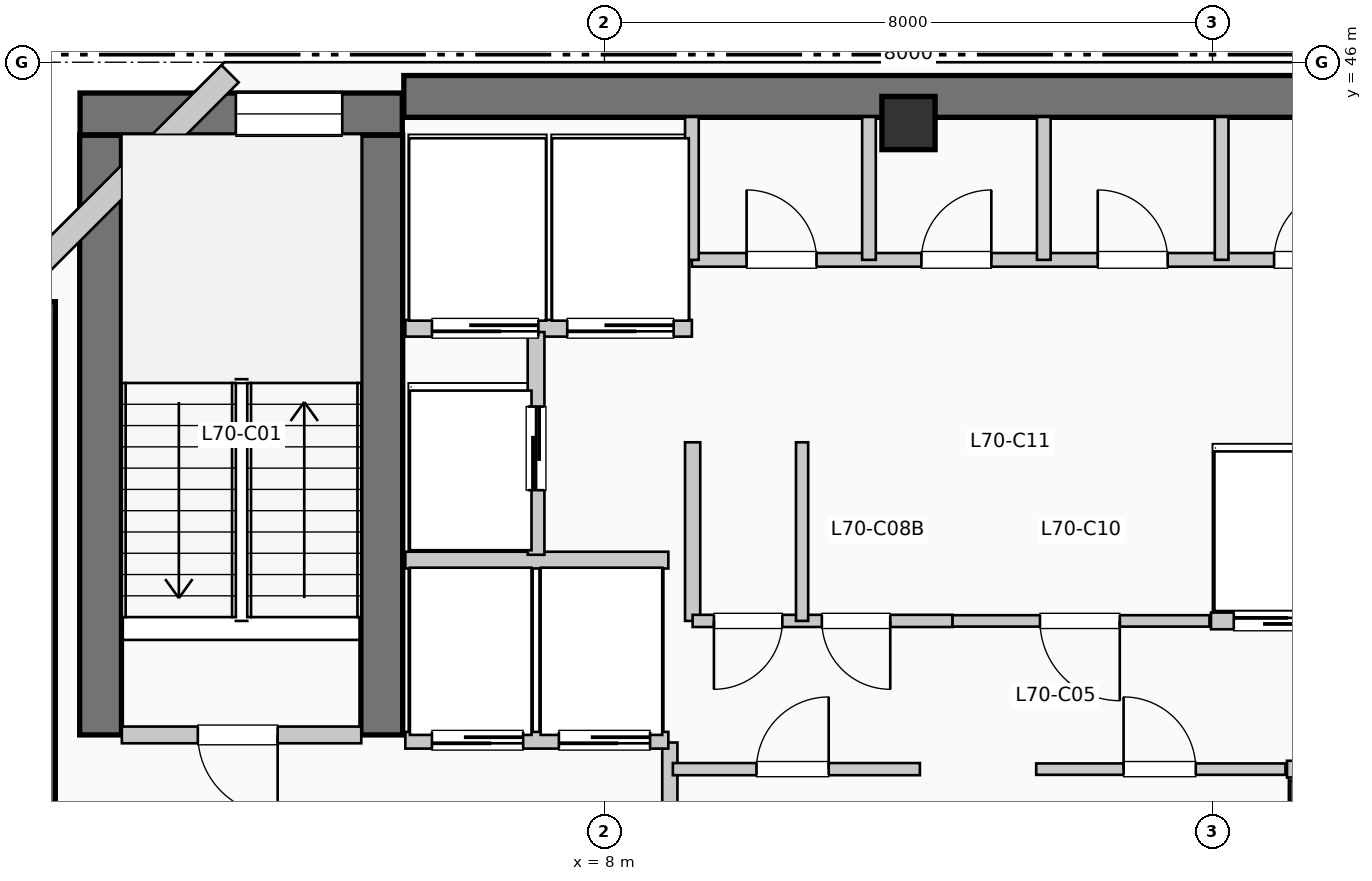
"""IFC4 building model, lengths in metres.
Left out: names, types, materials, properties, quantities, classifications, styles, units other than length and angle.
Written with IfcOpenShell. Run it as: python <this file> out.ifc"""

import sys

from ifc_helpers import new_model, si_unit, direction, frame, frame_2d, origin, origin_2d, place, context, subcontext, project, spatial, rectangle, extrude, element, fill, save


model = new_model("IFC4")
c1 = context("Model", 3, precision=1e-05, world=origin(), true_north=direction((0.0, 1.0)))
c2 = subcontext(c1, "Body", "Model", "MODEL_VIEW")
j1 = project(units=[si_unit("LENGTHUNIT", "METRE"), si_unit("PLANEANGLEUNIT", "RADIAN")], contexts=[c1])
p1 = place(None, origin())
s1 = spatial("IfcSite", under=j1, at=p1, CompositionType="ELEMENT")
p2 = place(p1, origin())
s2 = spatial("IfcBuilding", under=s1, at=p2, CompositionType="ELEMENT")
p3 = place(p2, frame((0.0, 0.0, 288.09)))
s3 = spatial("IfcBuildingStorey", under=s2, at=p3, CompositionType="ELEMENT", Elevation=288.09)
p4 = place(p3, frame((5.36, 45.55, 0.0), z_axis=(0.0, 0.0, 1.0), x_axis=(1.0, 0.0, 0.0)))
e1 = element("IfcWall", 1, at=p4, inside=s3, PredefinedType="SHEAR", context=c2, shape_type="SweptSolid", body=[
    extrude(rectangle(XDim=13.98, YDim=0.55, at=frame_2d((6.99, 0.0))), origin(), (0.0, 0.0, 1.0), 3.96),
])
p5 = place(p3, frame((0.5, 34.95, 0.0), z_axis=(0.0, 0.0, 1.0), x_axis=(0.0, 1.0, 0.0)))
e2 = element("IfcWall", 2, at=p5, inside=s3, PredefinedType="SHEAR", context=c2, shape_type="SweptSolid", body=[
    extrude(rectangle(XDim=7.9, YDim=0.55, at=frame_2d((3.95, 0.0))), origin(), (0.0, 0.0, 1.0), 3.96),
])
for number, where, z_axis, x_axis in (
    (3, (1.37, 37.15, 0.0), (0.0, 0.0, 1.0), (0.0, 1.0, 0.0)),
    (4, (5.07, 37.15, 0.0), (0.0, 0.0, 1.0), (0.0, 1.0, 0.0)),
):
    element("IfcWall", number, at=place(p3, frame(where, z_axis=z_axis, x_axis=x_axis)), inside=s3, PredefinedType="SHEAR", context=c2, shape_type="SweptSolid", body=[
        extrude(rectangle(XDim=7.89, YDim=0.55, at=frame_2d((3.945, 0.0))), origin(), (0.0, 0.0, 1.0), 3.96),
    ])
p6 = place(p3, frame((1.1, 45.32, 0.0), z_axis=(0.0, 0.0, 1.0), x_axis=(1.0, 0.0, 0.0)))
e5 = element("IfcWall", 5, at=p6, inside=s3, PredefinedType="SHEAR", context=c2, shape_type="SweptSolid", body=[
    extrude(rectangle(XDim=4.24, YDim=0.55, at=frame_2d((2.12, 0.0))), origin(), (0.0, 0.0, 1.0), 3.96),
])
p7 = place(p6, frame((2.05, 0.0, 1.05)))
e6 = element("IfcOpeningElement", 6, at=p7, cuts=e5, PredefinedType="OPENING", context=c2, shape_type="SweptSolid", body=[
    extrude(rectangle(XDim=1.4, YDim=1.8, at=frame_2d((0.7, 0.9))), frame((0.0, 0.285, 0.0), z_axis=(0.0, -1.0, 0.0), x_axis=(1.0, 0.0, 0.0)), (0.0, 0.0, 1.0), 0.57),
])
p8 = place(p3, frame((12.0, 45.2, 0.0), z_axis=(0.0, 0.0, 1.0), x_axis=(1.0, 0.0, 0.0)))
e7 = element("IfcColumn", 7, at=p8, inside=s3, PredefinedType="COLUMN", context=c2, shape_type="SweptSolid", body=[
    extrude(rectangle(XDim=0.7, YDim=0.7, at=origin_2d()), origin(), (0.0, 0.0, 1.0), 3.96),
])
p9 = place(p3, frame((3.074, 45.848, 0.0), z_axis=(0.0, 0.0, 1.0), x_axis=(-0.707106781187, -0.707106781187, 0.0)))
e8 = element("IfcWall", 8, at=p9, inside=s3, PredefinedType="SOLIDWALL", context=c2, shape_type="SweptSolid", body=[
    extrude(rectangle(XDim=4.133, YDim=0.32, at=frame_2d((2.066, 0.0))), origin(), (0.0, 0.0, 1.0), 3.74),
])
p10 = place(p3, frame((1.65, 37.15, 0.0), z_axis=(0.0, 0.0, 1.0), x_axis=(1.0, 0.0, 0.0)))
e9 = element("IfcWall", 9, at=p10, inside=s3, PredefinedType="PARTITIONING", context=c2, shape_type="SweptSolid", body=[
    extrude(rectangle(XDim=3.15, YDim=0.22, at=frame_2d((1.575, 0.0))), origin(), (0.0, 0.0, 1.0), 3.74),
])
p11 = place(p10, frame((2.05, 0.0, 0.0), z_axis=(0.0, 0.0, 1.0), x_axis=(-1.0, 0.0, 0.0)))
e10 = element("IfcOpeningElement", 10, at=p11, cuts=e9, PredefinedType="OPENING", context=c2, shape_type="SweptSolid", body=[
    extrude(rectangle(XDim=1.05, YDim=2.15, at=frame_2d((0.525, 1.075))), frame((0.0, 0.12, 0.0), z_axis=(0.0, -1.0, 0.0), x_axis=(1.0, 0.0, 0.0)), (0.0, 0.0, 1.0), 0.24),
])
p12 = place(p3, frame((8.86, 34.55, 0.0), z_axis=(0.0, 0.0, 1.0), x_axis=(0.0, 1.0, 0.0)))
e11 = element("IfcWall", 11, at=p12, inside=s3, PredefinedType="PARTITIONING", context=c2, shape_type="SweptSolid", body=[
    extrude(rectangle(XDim=2.5, YDim=0.2, at=frame_2d((1.25, 0.0))), origin(), (0.0, 0.0, 1.0), 3.74),
])
p13 = place(p3, frame((5.38, 37.08, 0.0), z_axis=(0.0, 0.0, 1.0), x_axis=(1.0, 0.0, 0.0)))
e12 = element("IfcWall", 12, at=p13, inside=s3, PredefinedType="PARTITIONING", context=c2, shape_type="SweptSolid", body=[
    extrude(rectangle(XDim=3.46, YDim=0.22, at=frame_2d((1.73, 0.0))), origin(), (0.0, 0.0, 1.0), 3.74),
])
p14 = place(p13, frame((1.55, 0.0, 0.0), z_axis=(0.0, 0.0, 1.0), x_axis=(-1.0, 0.0, 0.0)))
e13 = element("IfcOpeningElement", 13, at=p14, cuts=e12, PredefinedType="OPENING", context=c2, shape_type="SweptSolid", body=[
    extrude(rectangle(XDim=1.2, YDim=2.2, at=frame_2d((0.6, 1.1))), frame((0.0, 0.12, 0.0), z_axis=(0.0, -1.0, 0.0), x_axis=(1.0, 0.0, 0.0)), (0.0, 0.0, 1.0), 0.24),
])
p15 = place(p13, frame((3.22, 0.0, 0.0), z_axis=(0.0, 0.0, 1.0), x_axis=(-1.0, 0.0, 0.0)))
e14 = element("IfcOpeningElement", 14, at=p15, cuts=e12, PredefinedType="OPENING", context=c2, shape_type="SweptSolid", body=[
    extrude(rectangle(XDim=1.2, YDim=2.2, at=frame_2d((0.6, 1.1))), frame((0.0, 0.12, 0.0), z_axis=(0.0, -1.0, 0.0), x_axis=(1.0, 0.0, 0.0)), (0.0, 0.0, 1.0), 0.24),
])
p16 = place(p3, frame((5.38, 39.45, 0.0), z_axis=(0.0, 0.0, 1.0), x_axis=(1.0, 0.0, 0.0)))
e15 = element("IfcWall", 15, at=p16, inside=s3, PredefinedType="PARTITIONING", context=c2, shape_type="SweptSolid", body=[
    extrude(rectangle(XDim=3.46, YDim=0.22, at=frame_2d((1.73, 0.0))), origin(), (0.0, 0.0, 1.0), 3.74),
])
p17 = place(p3, frame((5.38, 42.5, 0.0), z_axis=(0.0, 0.0, 1.0), x_axis=(1.0, 0.0, 0.0)))
e16 = element("IfcWall", 16, at=p17, inside=s3, PredefinedType="PARTITIONING", context=c2, shape_type="SweptSolid", body=[
    extrude(rectangle(XDim=3.77, YDim=0.22, at=frame_2d((1.885, 0.0))), origin(), (0.0, 0.0, 1.0), 3.74),
])
p18 = place(p17, frame((1.75, 0.0, 0.0), z_axis=(0.0, 0.0, 1.0), x_axis=(-1.0, 0.0, 0.0)))
e17 = element("IfcOpeningElement", 17, at=p18, cuts=e16, PredefinedType="OPENING", context=c2, shape_type="SweptSolid", body=[
    extrude(rectangle(XDim=1.4, YDim=2.2, at=frame_2d((0.7, 1.1))), frame((0.0, 0.12, 0.0), z_axis=(0.0, -1.0, 0.0), x_axis=(1.0, 0.0, 0.0)), (0.0, 0.0, 1.0), 0.24),
])
p19 = place(p17, frame((3.53, 0.0, 0.0), z_axis=(0.0, 0.0, 1.0), x_axis=(-1.0, 0.0, 0.0)))
e18 = element("IfcOpeningElement", 18, at=p19, cuts=e16, PredefinedType="OPENING", context=c2, shape_type="SweptSolid", body=[
    extrude(rectangle(XDim=1.4, YDim=2.2, at=frame_2d((0.7, 1.1))), frame((0.0, 0.12, 0.0), z_axis=(0.0, -1.0, 0.0), x_axis=(1.0, 0.0, 0.0)), (0.0, 0.0, 1.0), 0.24),
])
p20 = place(p3, frame((7.1, 39.52, 0.0), z_axis=(0.0, 0.0, 1.0), x_axis=(0.0, 1.0, 0.0)))
e19 = element("IfcWall", 19, at=p20, inside=s3, PredefinedType="PARTITIONING", context=c2, shape_type="SweptSolid", body=[
    extrude(rectangle(XDim=2.93, YDim=0.22, at=frame_2d((1.465, 0.0))), origin(), (0.0, 0.0, 1.0), 3.74),
])
p21 = place(p20, frame((0.85, 0.0, 0.0)))
e20 = element("IfcOpeningElement", 20, at=p21, cuts=e19, PredefinedType="OPENING", context=c2, shape_type="SweptSolid", body=[
    extrude(rectangle(XDim=1.1, YDim=2.2, at=frame_2d((0.55, 1.1))), frame((0.0, 0.12, 0.0), z_axis=(0.0, -1.0, 0.0), x_axis=(1.0, 0.0, 0.0)), (0.0, 0.0, 1.0), 0.24),
])
p22 = place(p3, frame((9.16, 38.65, 0.0), z_axis=(0.0, 0.0, 1.0), x_axis=(0.0, 1.0, 0.0)))
e21 = element("IfcWall", 21, at=p22, inside=s3, PredefinedType="PARTITIONING", context=c2, shape_type="SweptSolid", body=[
    extrude(rectangle(XDim=2.35, YDim=0.2, at=frame_2d((1.175, 0.0))), origin(), (0.0, 0.0, 1.0), 3.74),
])
p23 = place(p3, frame((8.9, 36.7, 0.0), z_axis=(0.0, 0.0, 1.0), x_axis=(1.0, 0.0, 0.0)))
e22 = element("IfcWall", 22, at=p23, inside=s3, PredefinedType="PARTITIONING", context=c2, shape_type="SweptSolid", body=[
    extrude(rectangle(XDim=3.25, YDim=0.16, at=frame_2d((1.625, 0.0))), origin(), (0.0, 0.0, 1.0), 3.74),
])
p24 = place(p23, frame((1.1, 0.0, 0.0)))
e23 = element("IfcOpeningElement", 23, at=p24, cuts=e22, PredefinedType="OPENING", context=c2, shape_type="SweptSolid", body=[
    extrude(rectangle(XDim=0.95, YDim=2.15, at=frame_2d((0.475, 1.075))), frame((0.0, 0.09, 0.0), z_axis=(0.0, -1.0, 0.0), x_axis=(1.0, 0.0, 0.0)), (0.0, 0.0, 1.0), 0.18),
])
p25 = place(p3, frame((9.16, 38.65, 0.0), z_axis=(0.0, 0.0, 1.0), x_axis=(1.0, 0.0, 0.0)))
e24 = element("IfcWall", 24, at=p25, inside=s3, PredefinedType="PARTITIONING", context=c2, shape_type="SweptSolid", body=[
    extrude(rectangle(XDim=3.42, YDim=0.16, at=frame_2d((1.71, 0.0))), origin(), (0.0, 0.0, 1.0), 3.74),
])
p26 = place(p25, frame((1.18, 0.0, 0.0), z_axis=(0.0, 0.0, 1.0), x_axis=(-1.0, 0.0, 0.0)))
e25 = element("IfcOpeningElement", 25, at=p26, cuts=e24, PredefinedType="OPENING", context=c2, shape_type="SweptSolid", body=[
    extrude(rectangle(XDim=0.9, YDim=2.15, at=frame_2d((0.45, 1.075))), frame((0.0, 0.09, 0.0), z_axis=(0.0, -1.0, 0.0), x_axis=(1.0, 0.0, 0.0)), (0.0, 0.0, 1.0), 0.18),
])
p27 = place(p25, frame((2.6, 0.0, 0.0), z_axis=(0.0, 0.0, 1.0), x_axis=(-1.0, 0.0, 0.0)))
e26 = element("IfcOpeningElement", 26, at=p27, cuts=e24, PredefinedType="OPENING", context=c2, shape_type="SweptSolid", body=[
    extrude(rectangle(XDim=0.9, YDim=2.15, at=frame_2d((0.45, 1.075))), frame((0.0, 0.09, 0.0), z_axis=(0.0, -1.0, 0.0), x_axis=(1.0, 0.0, 0.0)), (0.0, 0.0, 1.0), 0.18),
])
p28 = place(p3, frame((10.6, 38.65, 0.0), z_axis=(0.0, 0.0, 1.0), x_axis=(0.0, 1.0, 0.0)))
e27 = element("IfcWall", 27, at=p28, inside=s3, PredefinedType="PARTITIONING", context=c2, shape_type="SweptSolid", body=[
    extrude(rectangle(XDim=2.35, YDim=0.16, at=frame_2d((1.175, 0.0))), origin(), (0.0, 0.0, 1.0), 3.74),
])
p29 = place(p3, frame((13.68, 36.7, 0.0), z_axis=(0.0, 0.0, 1.0), x_axis=(1.0, 0.0, 0.0)))
e28 = element("IfcWall", 28, at=p29, inside=s3, PredefinedType="PARTITIONING", context=c2, shape_type="SweptSolid", body=[
    extrude(rectangle(XDim=3.28, YDim=0.15, at=frame_2d((1.64, 0.0))), origin(), (0.0, 0.0, 1.0), 3.74),
])
p30 = place(p29, frame((1.15, 0.0, 0.0)))
e29 = element("IfcOpeningElement", 29, at=p30, cuts=e28, PredefinedType="OPENING", context=c2, shape_type="SweptSolid", body=[
    extrude(rectangle(XDim=0.95, YDim=2.15, at=frame_2d((0.475, 1.075))), frame((0.0, 0.085, 0.0), z_axis=(0.0, -1.0, 0.0), x_axis=(1.0, 0.0, 0.0)), (0.0, 0.0, 1.0), 0.17),
])
p31 = place(p3, frame((12.58, 38.65, 0.0), z_axis=(0.0, 0.0, 1.0), x_axis=(1.0, 0.0, 0.0)))
e30 = element("IfcWall", 30, at=p31, inside=s3, PredefinedType="PARTITIONING", context=c2, shape_type="SweptSolid", body=[
    extrude(rectangle(XDim=3.38, YDim=0.15, at=frame_2d((1.69, 0.0))), origin(), (0.0, 0.0, 1.0), 3.74),
])
p32 = place(p31, frame((2.2, 0.0, 0.0), z_axis=(0.0, 0.0, 1.0), x_axis=(-1.0, 0.0, 0.0)))
e31 = element("IfcOpeningElement", 31, at=p32, cuts=e30, PredefinedType="OPENING", context=c2, shape_type="SweptSolid", body=[
    extrude(rectangle(XDim=1.05, YDim=2.15, at=frame_2d((0.525, 1.075))), frame((0.0, 0.085, 0.0), z_axis=(0.0, -1.0, 0.0), x_axis=(1.0, 0.0, 0.0)), (0.0, 0.0, 1.0), 0.17),
])
p33 = place(p3, frame((16.98, 36.7, 0.0), z_axis=(0.0, 0.0, 1.0), x_axis=(1.0, 0.0, 0.0)))
e32 = element("IfcWall", 32, at=p33, inside=s3, PredefinedType="PARTITIONING", context=c2, shape_type="SweptSolid", body=[
    extrude(rectangle(XDim=1.7, YDim=0.22, at=frame_2d((0.85, 0.0))), origin(), (0.0, 0.0, 1.0), 3.74),
])
p34 = place(p33, frame((0.3, 0.0, 0.0)))
e33 = element("IfcOpeningElement", 33, at=p34, cuts=e32, PredefinedType="OPENING", context=c2, shape_type="SweptSolid", body=[
    extrude(rectangle(XDim=1.1, YDim=2.2, at=frame_2d((0.55, 1.1))), frame((0.0, 0.12, 0.0), z_axis=(0.0, -1.0, 0.0), x_axis=(1.0, 0.0, 0.0)), (0.0, 0.0, 1.0), 0.24),
])
p35 = place(p3, frame((15.98, 38.65, 0.0), z_axis=(0.0, 0.0, 1.0), x_axis=(1.0, 0.0, 0.0)))
e34 = element("IfcWall", 34, at=p35, inside=s3, PredefinedType="PARTITIONING", context=c2, shape_type="SweptSolid", body=[
    extrude(rectangle(XDim=1.72, YDim=0.22, at=frame_2d((0.86, 0.0))), origin(), (0.0, 0.0, 1.0), 3.74),
])
p36 = place(p35, frame((0.3, 0.0, 0.0)))
e35 = element("IfcOpeningElement", 35, at=p36, cuts=e34, PredefinedType="OPENING", context=c2, shape_type="SweptSolid", body=[
    extrude(rectangle(XDim=1.1, YDim=2.2, at=frame_2d((0.55, 1.1))), frame((0.0, 0.12, 0.0), z_axis=(0.0, -1.0, 0.0), x_axis=(1.0, 0.0, 0.0)), (0.0, 0.0, 1.0), 0.24),
])
p37 = place(p3, frame((9.15, 43.4, 0.0), z_axis=(0.0, 0.0, 1.0), x_axis=(1.0, 0.0, 0.0)))
e36 = element("IfcWall", 36, at=p37, inside=s3, PredefinedType="PLUMBINGWALL", context=c2, shape_type="SweptSolid", body=[
    extrude(rectangle(XDim=9.33, YDim=0.18, at=frame_2d((4.665, 0.0))), origin(), (0.0, 0.0, 1.0), 3.74),
])
p38 = place(p37, frame((0.72, 0.0, 0.0)))
e37 = element("IfcOpeningElement", 37, at=p38, cuts=e36, PredefinedType="OPENING", context=c2, shape_type="SweptSolid", body=[
    extrude(rectangle(XDim=0.92, YDim=2.1, at=frame_2d((0.46, 1.05))), frame((0.0, 0.1, 0.0), z_axis=(0.0, -1.0, 0.0), x_axis=(1.0, 0.0, 0.0)), (0.0, 0.0, 1.0), 0.2),
])
p39 = place(p37, frame((3.02, 0.0, 0.0)))
e38 = element("IfcOpeningElement", 38, at=p39, cuts=e36, PredefinedType="OPENING", context=c2, shape_type="SweptSolid", body=[
    extrude(rectangle(XDim=0.92, YDim=2.1, at=frame_2d((0.46, 1.05))), frame((0.0, 0.1, 0.0), z_axis=(0.0, -1.0, 0.0), x_axis=(1.0, 0.0, 0.0)), (0.0, 0.0, 1.0), 0.2),
])
p40 = place(p37, frame((5.34, 0.0, 0.0)))
e39 = element("IfcOpeningElement", 39, at=p40, cuts=e36, PredefinedType="OPENING", context=c2, shape_type="SweptSolid", body=[
    extrude(rectangle(XDim=0.92, YDim=2.1, at=frame_2d((0.46, 1.05))), frame((0.0, 0.1, 0.0), z_axis=(0.0, -1.0, 0.0), x_axis=(1.0, 0.0, 0.0)), (0.0, 0.0, 1.0), 0.2),
])
p41 = place(p37, frame((7.66, 0.0, 0.0)))
e40 = element("IfcOpeningElement", 40, at=p41, cuts=e36, PredefinedType="OPENING", context=c2, shape_type="SweptSolid", body=[
    extrude(rectangle(XDim=0.95, YDim=2.1, at=frame_2d((0.475, 1.05))), frame((0.0, 0.1, 0.0), z_axis=(0.0, -1.0, 0.0), x_axis=(1.0, 0.0, 0.0)), (0.0, 0.0, 1.0), 0.2),
])
for number, where, z_axis, x_axis in (
    (41, (9.15, 43.4, 0.0), (0.0, 0.0, 1.0), (0.0, 1.0, 0.0)),
    (42, (11.48, 43.4, 0.0), (0.0, 0.0, 1.0), (0.0, 1.0, 0.0)),
    (43, (13.78, 43.4, 0.0), (0.0, 0.0, 1.0), (0.0, 1.0, 0.0)),
    (44, (16.12, 43.4, 0.0), (0.0, 0.0, 1.0), (0.0, 1.0, 0.0)),
):
    element("IfcWall", number, at=place(p3, frame(where, z_axis=z_axis, x_axis=x_axis)), inside=s3, PredefinedType="PLUMBINGWALL", context=c2, shape_type="SweptSolid", body=[
        extrude(rectangle(XDim=1.88, YDim=0.18, at=frame_2d((0.94, 0.0))), origin(), (0.0, 0.0, 1.0), 3.74),
    ])
p42 = place(p7, origin())
e45 = element("IfcWindow", 45, at=p42, inside=s3, PartitioningType="SINGLE_PANEL", PredefinedType="WINDOW", context=c2, shape_type="SweptSolid", body=[
    extrude(rectangle(XDim=1.4, YDim=1.8, at=frame_2d((0.7, 0.9))), frame((0.0, 0.03, 0.0), z_axis=(0.0, -1.0, 0.0), x_axis=(1.0, 0.0, 0.0)), (0.0, 0.0, 1.0), 0.06),
])
fill(e6, e45)
p43 = place(p11, origin())
e46 = element("IfcDoor", 46, at=p43, inside=s3, OperationType="SINGLE_SWING_RIGHT", PredefinedType="DOOR", context=c2, shape_type="SweptSolid", body=[
    extrude(rectangle(XDim=1.05, YDim=2.15, at=frame_2d((0.525, 1.075))), frame((0.0, 0.025, 0.0), z_axis=(0.0, -1.0, 0.0), x_axis=(1.0, 0.0, 0.0)), (0.0, 0.0, 1.0), 0.05),
])
fill(e10, e46)
p44 = place(p14, origin())
e47 = element("IfcDoor", 47, at=p44, inside=s3, OperationType="SLIDING_TO_RIGHT", PredefinedType="DOOR", context=c2, shape_type="SweptSolid", body=[
    extrude(rectangle(XDim=1.2, YDim=2.2, at=frame_2d((0.6, 1.1))), frame((0.0, 0.025, 0.0), z_axis=(0.0, -1.0, 0.0), x_axis=(1.0, 0.0, 0.0)), (0.0, 0.0, 1.0), 0.05),
])
fill(e13, e47)
p45 = place(p15, origin())
e48 = element("IfcDoor", 48, at=p45, inside=s3, OperationType="SLIDING_TO_RIGHT", PredefinedType="DOOR", context=c2, shape_type="SweptSolid", body=[
    extrude(rectangle(XDim=1.2, YDim=2.2, at=frame_2d((0.6, 1.1))), frame((0.0, 0.025, 0.0), z_axis=(0.0, -1.0, 0.0), x_axis=(1.0, 0.0, 0.0)), (0.0, 0.0, 1.0), 0.05),
])
fill(e14, e48)
p46 = place(p18, origin())
e49 = element("IfcDoor", 49, at=p46, inside=s3, OperationType="SLIDING_TO_LEFT", PredefinedType="DOOR", context=c2, shape_type="SweptSolid", body=[
    extrude(rectangle(XDim=1.4, YDim=2.2, at=frame_2d((0.7, 1.1))), frame((0.0, 0.025, 0.0), z_axis=(0.0, -1.0, 0.0), x_axis=(1.0, 0.0, 0.0)), (0.0, 0.0, 1.0), 0.05),
])
fill(e17, e49)
p47 = place(p19, origin())
e50 = element("IfcDoor", 50, at=p47, inside=s3, OperationType="SLIDING_TO_LEFT", PredefinedType="DOOR", context=c2, shape_type="SweptSolid", body=[
    extrude(rectangle(XDim=1.4, YDim=2.2, at=frame_2d((0.7, 1.1))), frame((0.0, 0.025, 0.0), z_axis=(0.0, -1.0, 0.0), x_axis=(1.0, 0.0, 0.0)), (0.0, 0.0, 1.0), 0.05),
])
fill(e18, e50)
p48 = place(p21, origin())
e51 = element("IfcDoor", 51, at=p48, inside=s3, OperationType="SLIDING_TO_LEFT", PredefinedType="DOOR", context=c2, shape_type="SweptSolid", body=[
    extrude(rectangle(XDim=1.1, YDim=2.2, at=frame_2d((0.55, 1.1))), frame((0.0, 0.025, 0.0), z_axis=(0.0, -1.0, 0.0), x_axis=(1.0, 0.0, 0.0)), (0.0, 0.0, 1.0), 0.05),
])
fill(e20, e51)
p49 = place(p24, origin())
e52 = element("IfcDoor", 52, at=p49, inside=s3, OperationType="SINGLE_SWING_RIGHT", PredefinedType="DOOR", context=c2, shape_type="SweptSolid", body=[
    extrude(rectangle(XDim=0.95, YDim=2.15, at=frame_2d((0.475, 1.075))), frame((0.0, 0.025, 0.0), z_axis=(0.0, -1.0, 0.0), x_axis=(1.0, 0.0, 0.0)), (0.0, 0.0, 1.0), 0.05),
])
fill(e23, e52)
p50 = place(p26, origin())
e53 = element("IfcDoor", 53, at=p50, inside=s3, OperationType="SINGLE_SWING_LEFT", PredefinedType="DOOR", context=c2, shape_type="SweptSolid", body=[
    extrude(rectangle(XDim=0.9, YDim=2.15, at=frame_2d((0.45, 1.075))), frame((0.0, 0.025, 0.0), z_axis=(0.0, -1.0, 0.0), x_axis=(1.0, 0.0, 0.0)), (0.0, 0.0, 1.0), 0.05),
])
fill(e25, e53)
p51 = place(p27, origin())
e54 = element("IfcDoor", 54, at=p51, inside=s3, OperationType="SINGLE_SWING_RIGHT", PredefinedType="DOOR", context=c2, shape_type="SweptSolid", body=[
    extrude(rectangle(XDim=0.9, YDim=2.15, at=frame_2d((0.45, 1.075))), frame((0.0, 0.025, 0.0), z_axis=(0.0, -1.0, 0.0), x_axis=(1.0, 0.0, 0.0)), (0.0, 0.0, 1.0), 0.05),
])
fill(e26, e54)
p52 = place(p30, origin())
e55 = element("IfcDoor", 55, at=p52, inside=s3, OperationType="SINGLE_SWING_LEFT", PredefinedType="DOOR", context=c2, shape_type="SweptSolid", body=[
    extrude(rectangle(XDim=0.95, YDim=2.15, at=frame_2d((0.475, 1.075))), frame((0.0, 0.025, 0.0), z_axis=(0.0, -1.0, 0.0), x_axis=(1.0, 0.0, 0.0)), (0.0, 0.0, 1.0), 0.05),
])
fill(e29, e55)
p53 = place(p32, origin())
e56 = element("IfcDoor", 56, at=p53, inside=s3, OperationType="SINGLE_SWING_RIGHT", PredefinedType="DOOR", context=c2, shape_type="SweptSolid", body=[
    extrude(rectangle(XDim=1.05, YDim=2.15, at=frame_2d((0.525, 1.075))), frame((0.0, 0.025, 0.0), z_axis=(0.0, -1.0, 0.0), x_axis=(1.0, 0.0, 0.0)), (0.0, 0.0, 1.0), 0.05),
])
fill(e31, e56)
p54 = place(p36, origin())
e57 = element("IfcDoor", 57, at=p54, inside=s3, OperationType="SLIDING_TO_LEFT", PredefinedType="DOOR", context=c2, shape_type="SweptSolid", body=[
    extrude(rectangle(XDim=1.1, YDim=2.2, at=frame_2d((0.55, 1.1))), frame((0.0, 0.025, 0.0), z_axis=(0.0, -1.0, 0.0), x_axis=(1.0, 0.0, 0.0)), (0.0, 0.0, 1.0), 0.05),
])
fill(e35, e57)
p55 = place(p38, origin())
e58 = element("IfcDoor", 58, at=p55, inside=s3, OperationType="SINGLE_SWING_LEFT", PredefinedType="DOOR", context=c2, shape_type="SweptSolid", body=[
    extrude(rectangle(XDim=0.92, YDim=2.1, at=frame_2d((0.46, 1.05))), frame((0.0, 0.025, 0.0), z_axis=(0.0, -1.0, 0.0), x_axis=(1.0, 0.0, 0.0)), (0.0, 0.0, 1.0), 0.05),
])
fill(e37, e58)
p56 = place(p39, origin())
e59 = element("IfcDoor", 59, at=p56, inside=s3, OperationType="SINGLE_SWING_RIGHT", PredefinedType="DOOR", context=c2, shape_type="SweptSolid", body=[
    extrude(rectangle(XDim=0.92, YDim=2.1, at=frame_2d((0.46, 1.05))), frame((0.0, 0.025, 0.0), z_axis=(0.0, -1.0, 0.0), x_axis=(1.0, 0.0, 0.0)), (0.0, 0.0, 1.0), 0.05),
])
fill(e38, e59)
p57 = place(p40, origin())
e60 = element("IfcDoor", 60, at=p57, inside=s3, OperationType="SINGLE_SWING_LEFT", PredefinedType="DOOR", context=c2, shape_type="SweptSolid", body=[
    extrude(rectangle(XDim=0.92, YDim=2.1, at=frame_2d((0.46, 1.05))), frame((0.0, 0.025, 0.0), z_axis=(0.0, -1.0, 0.0), x_axis=(1.0, 0.0, 0.0)), (0.0, 0.0, 1.0), 0.05),
])
fill(e39, e60)
p58 = place(p41, origin())
e61 = element("IfcDoor", 61, at=p58, inside=s3, OperationType="SINGLE_SWING_RIGHT", PredefinedType="DOOR", context=c2, shape_type="SweptSolid", body=[
    extrude(rectangle(XDim=0.95, YDim=2.1, at=frame_2d((0.475, 1.05))), frame((0.0, 0.025, 0.0), z_axis=(0.0, -1.0, 0.0), x_axis=(1.0, 0.0, 0.0)), (0.0, 0.0, 1.0), 0.05),
])
fill(e40, e61)
save(model, sys.argv[1])
